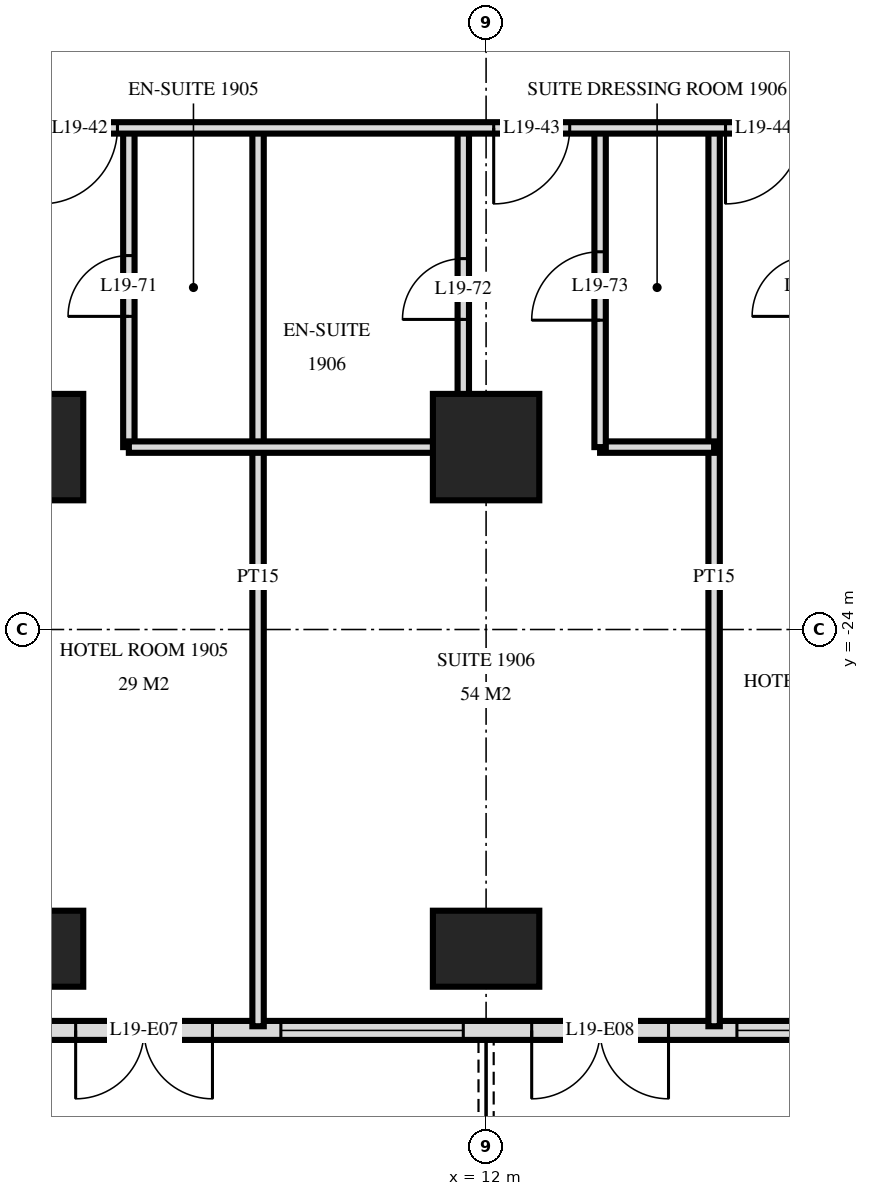
"""IFC4 building model, lengths in metres.
Left out: names, types, materials, properties, quantities, classifications, styles, units other than length and angle.
Written with IfcOpenShell. Run it as: python <this file> out.ifc"""

import sys

from ifc_helpers import new_model, si_unit, direction, frame, frame_2d, origin, origin_2d, place, context, subcontext, project, spatial, rectangle, extrude, element, fill, save


model = new_model("IFC4")
c1 = context("Model", 3, precision=1e-05, world=origin(), true_north=direction((0.0, 1.0)))
c2 = subcontext(c1, "Body", "Model", "MODEL_VIEW")
j1 = project(units=[si_unit("LENGTHUNIT", "METRE"), si_unit("PLANEANGLEUNIT", "RADIAN")], contexts=[c1])
p1 = place(None, origin())
s1 = spatial("IfcSite", under=j1, at=p1, CompositionType="ELEMENT")
p2 = place(p1, origin())
s2 = spatial("IfcBuilding", under=s1, at=p2, CompositionType="ELEMENT")
p3 = place(p2, frame((0.0, 0.0, 78.0)))
s3 = spatial("IfcBuildingStorey", under=s2, at=p3, CompositionType="ELEMENT", Elevation=78.0)
p4 = place(p3, frame((6.0, -28.2, 0.0), z_axis=(0.0, 0.0, 1.0), x_axis=(1.0, 0.0, 0.0)))
e1 = element("IfcColumn", 1, at=p4, inside=s3, PredefinedType="COLUMN", context=c2, shape_type="SweptSolid", body=[
    extrude(rectangle(XDim=1.4, YDim=1.0, at=origin_2d()), origin(), (0.0, 0.0, 1.0), 3.6),
])
p5 = place(p3, frame((6.0, -21.6, 0.0), z_axis=(0.0, 0.0, 1.0), x_axis=(1.0, 0.0, 0.0)))
e2 = element("IfcColumn", 2, at=p5, inside=s3, PredefinedType="COLUMN", context=c2, shape_type="SweptSolid", body=[
    extrude(rectangle(XDim=1.4, YDim=1.4, at=origin_2d()), origin(), (0.0, 0.0, 1.0), 3.6),
])
p6 = place(p3, frame((12.0, -28.2, 0.0), z_axis=(0.0, 0.0, 1.0), x_axis=(1.0, 0.0, 0.0)))
e3 = element("IfcColumn", 3, at=p6, inside=s3, PredefinedType="COLUMN", context=c2, shape_type="SweptSolid", body=[
    extrude(rectangle(XDim=1.4, YDim=1.0, at=origin_2d()), origin(), (0.0, 0.0, 1.0), 3.6),
])
p7 = place(p3, frame((12.0, -21.6, 0.0), z_axis=(0.0, 0.0, 1.0), x_axis=(1.0, 0.0, 0.0)))
e4 = element("IfcColumn", 4, at=p7, inside=s3, PredefinedType="COLUMN", context=c2, shape_type="SweptSolid", body=[
    extrude(rectangle(XDim=1.4, YDim=1.4, at=origin_2d()), origin(), (0.0, 0.0, 1.0), 3.6),
])
p8 = place(p3, frame((-28.775, -29.275, 0.0), z_axis=(0.0, 0.0, 1.0), x_axis=(1.0, 0.0, 0.0)))
e5 = element("IfcWall", 5, at=p8, inside=s3, PredefinedType="SOLIDWALL", context=c2, shape_type="SweptSolid", body=[
    extrude(rectangle(XDim=57.551, YDim=0.25, at=frame_2d((28.775, 0.0))), origin(), (0.0, 0.0, 1.0), 3.32),
])
p9 = place(p8, frame((0.575, 0.0, 0.0)))
e6 = element("IfcOpeningElement", 6, at=p9, cuts=e5, PredefinedType="OPENING", context=c2, shape_type="SweptSolid", body=[
    extrude(rectangle(XDim=1.8, YDim=2.4, at=frame_2d((0.9, 1.2))), frame((0.0, 0.135, 0.0), z_axis=(0.0, -1.0, 0.0), x_axis=(1.0, 0.0, 0.0)), (0.0, 0.0, 1.0), 0.27),
])
p10 = place(p8, frame((5.375, 0.0, 0.0)))
e7 = element("IfcOpeningElement", 7, at=p10, cuts=e5, PredefinedType="OPENING", context=c2, shape_type="SweptSolid", body=[
    extrude(rectangle(XDim=1.8, YDim=2.4, at=frame_2d((0.9, 1.2))), frame((0.0, 0.135, 0.0), z_axis=(0.0, -1.0, 0.0), x_axis=(1.0, 0.0, 0.0)), (0.0, 0.0, 1.0), 0.27),
])
p11 = place(p8, frame((8.075, 0.0, 0.3)))
e8 = element("IfcOpeningElement", 8, at=p11, cuts=e5, PredefinedType="OPENING", context=c2, shape_type="SweptSolid", body=[
    extrude(rectangle(XDim=2.4, YDim=2.1, at=frame_2d((1.2, 1.05))), frame((0.0, 0.135, 0.0), z_axis=(0.0, -1.0, 0.0), x_axis=(1.0, 0.0, 0.0)), (0.0, 0.0, 1.0), 0.27),
])
p12 = place(p8, frame((11.375, 0.0, 0.0)))
e9 = element("IfcOpeningElement", 9, at=p12, cuts=e5, PredefinedType="OPENING", context=c2, shape_type="SweptSolid", body=[
    extrude(rectangle(XDim=1.8, YDim=2.4, at=frame_2d((0.9, 1.2))), frame((0.0, 0.135, 0.0), z_axis=(0.0, -1.0, 0.0), x_axis=(1.0, 0.0, 0.0)), (0.0, 0.0, 1.0), 0.27),
])
p13 = place(p8, frame((14.075, 0.0, 0.3)))
e10 = element("IfcOpeningElement", 10, at=p13, cuts=e5, PredefinedType="OPENING", context=c2, shape_type="SweptSolid", body=[
    extrude(rectangle(XDim=2.4, YDim=2.1, at=frame_2d((1.2, 1.05))), frame((0.0, 0.135, 0.0), z_axis=(0.0, -1.0, 0.0), x_axis=(1.0, 0.0, 0.0)), (0.0, 0.0, 1.0), 0.27),
])
p14 = place(p8, frame((17.075, 0.0, 0.3)))
e11 = element("IfcOpeningElement", 11, at=p14, cuts=e5, PredefinedType="OPENING", context=c2, shape_type="SweptSolid", body=[
    extrude(rectangle(XDim=2.4, YDim=2.1, at=frame_2d((1.2, 1.05))), frame((0.0, 0.135, 0.0), z_axis=(0.0, -1.0, 0.0), x_axis=(1.0, 0.0, 0.0)), (0.0, 0.0, 1.0), 0.27),
])
p15 = place(p8, frame((20.375, 0.0, 0.0)))
e12 = element("IfcOpeningElement", 12, at=p15, cuts=e5, PredefinedType="OPENING", context=c2, shape_type="SweptSolid", body=[
    extrude(rectangle(XDim=1.8, YDim=2.4, at=frame_2d((0.9, 1.2))), frame((0.0, 0.135, 0.0), z_axis=(0.0, -1.0, 0.0), x_axis=(1.0, 0.0, 0.0)), (0.0, 0.0, 1.0), 0.27),
])
p16 = place(p8, frame((23.375, 0.0, 0.0)))
e13 = element("IfcOpeningElement", 13, at=p16, cuts=e5, PredefinedType="OPENING", context=c2, shape_type="SweptSolid", body=[
    extrude(rectangle(XDim=1.8, YDim=2.4, at=frame_2d((0.9, 1.2))), frame((0.0, 0.135, 0.0), z_axis=(0.0, -1.0, 0.0), x_axis=(1.0, 0.0, 0.0)), (0.0, 0.0, 1.0), 0.27),
])
p17 = place(p8, frame((26.075, 0.0, 0.3)))
e14 = element("IfcOpeningElement", 14, at=p17, cuts=e5, PredefinedType="OPENING", context=c2, shape_type="SweptSolid", body=[
    extrude(rectangle(XDim=2.4, YDim=2.1, at=frame_2d((1.2, 1.05))), frame((0.0, 0.135, 0.0), z_axis=(0.0, -1.0, 0.0), x_axis=(1.0, 0.0, 0.0)), (0.0, 0.0, 1.0), 0.27),
])
p18 = place(p8, frame((29.375, 0.0, 0.0)))
e15 = element("IfcOpeningElement", 15, at=p18, cuts=e5, PredefinedType="OPENING", context=c2, shape_type="SweptSolid", body=[
    extrude(rectangle(XDim=1.8, YDim=2.4, at=frame_2d((0.9, 1.2))), frame((0.0, 0.135, 0.0), z_axis=(0.0, -1.0, 0.0), x_axis=(1.0, 0.0, 0.0)), (0.0, 0.0, 1.0), 0.27),
])
p19 = place(p8, frame((32.075, 0.0, 0.3)))
e16 = element("IfcOpeningElement", 16, at=p19, cuts=e5, PredefinedType="OPENING", context=c2, shape_type="SweptSolid", body=[
    extrude(rectangle(XDim=2.4, YDim=2.1, at=frame_2d((1.2, 1.05))), frame((0.0, 0.135, 0.0), z_axis=(0.0, -1.0, 0.0), x_axis=(1.0, 0.0, 0.0)), (0.0, 0.0, 1.0), 0.27),
])
p20 = place(p8, frame((35.375, 0.0, 0.0)))
e17 = element("IfcOpeningElement", 17, at=p20, cuts=e5, PredefinedType="OPENING", context=c2, shape_type="SweptSolid", body=[
    extrude(rectangle(XDim=1.8, YDim=2.4, at=frame_2d((0.9, 1.2))), frame((0.0, 0.135, 0.0), z_axis=(0.0, -1.0, 0.0), x_axis=(1.0, 0.0, 0.0)), (0.0, 0.0, 1.0), 0.27),
])
p21 = place(p8, frame((38.075, 0.0, 0.3)))
e18 = element("IfcOpeningElement", 18, at=p21, cuts=e5, PredefinedType="OPENING", context=c2, shape_type="SweptSolid", body=[
    extrude(rectangle(XDim=2.4, YDim=2.1, at=frame_2d((1.2, 1.05))), frame((0.0, 0.135, 0.0), z_axis=(0.0, -1.0, 0.0), x_axis=(1.0, 0.0, 0.0)), (0.0, 0.0, 1.0), 0.27),
])
p22 = place(p8, frame((41.375, 0.0, 0.0)))
e19 = element("IfcOpeningElement", 19, at=p22, cuts=e5, PredefinedType="OPENING", context=c2, shape_type="SweptSolid", body=[
    extrude(rectangle(XDim=1.8, YDim=2.4, at=frame_2d((0.9, 1.2))), frame((0.0, 0.135, 0.0), z_axis=(0.0, -1.0, 0.0), x_axis=(1.0, 0.0, 0.0)), (0.0, 0.0, 1.0), 0.27),
])
p23 = place(p8, frame((44.075, 0.0, 0.3)))
e20 = element("IfcOpeningElement", 20, at=p23, cuts=e5, PredefinedType="OPENING", context=c2, shape_type="SweptSolid", body=[
    extrude(rectangle(XDim=2.4, YDim=2.1, at=frame_2d((1.2, 1.05))), frame((0.0, 0.135, 0.0), z_axis=(0.0, -1.0, 0.0), x_axis=(1.0, 0.0, 0.0)), (0.0, 0.0, 1.0), 0.27),
])
p24 = place(p8, frame((47.075, 0.0, 0.3)))
e21 = element("IfcOpeningElement", 21, at=p24, cuts=e5, PredefinedType="OPENING", context=c2, shape_type="SweptSolid", body=[
    extrude(rectangle(XDim=2.4, YDim=2.1, at=frame_2d((1.2, 1.05))), frame((0.0, 0.135, 0.0), z_axis=(0.0, -1.0, 0.0), x_axis=(1.0, 0.0, 0.0)), (0.0, 0.0, 1.0), 0.27),
])
p25 = place(p8, frame((50.375, 0.0, 0.0)))
e22 = element("IfcOpeningElement", 22, at=p25, cuts=e5, PredefinedType="OPENING", context=c2, shape_type="SweptSolid", body=[
    extrude(rectangle(XDim=1.8, YDim=2.4, at=frame_2d((0.9, 1.2))), frame((0.0, 0.135, 0.0), z_axis=(0.0, -1.0, 0.0), x_axis=(1.0, 0.0, 0.0)), (0.0, 0.0, 1.0), 0.27),
])
p26 = place(p8, frame((53.375, 0.0, 0.0)))
e23 = element("IfcOpeningElement", 23, at=p26, cuts=e5, PredefinedType="OPENING", context=c2, shape_type="SweptSolid", body=[
    extrude(rectangle(XDim=1.8, YDim=2.4, at=frame_2d((0.9, 1.2))), frame((0.0, 0.135, 0.0), z_axis=(0.0, -1.0, 0.0), x_axis=(1.0, 0.0, 0.0)), (0.0, 0.0, 1.0), 0.27),
])
p27 = place(p3, frame((15.0, -29.22, 0.0), z_axis=(0.0, 0.0, 1.0), x_axis=(0.0, 1.0, 0.0)))
e24 = element("IfcWall", 24, at=p27, inside=s3, PredefinedType="PARTITIONING", context=c2, shape_type="SweptSolid", body=[
    extrude(rectangle(XDim=11.82, YDim=0.15, at=frame_2d((5.91, 0.0))), origin(), (0.0, 0.0, 1.0), 3.32),
])
p28 = place(p3, frame((13.5, -21.6, 0.0), z_axis=(0.0, 0.0, 1.0), x_axis=(0.0, 1.0, 0.0)))
e25 = element("IfcWall", 25, at=p28, inside=s3, PredefinedType="PARTITIONING", context=c2, shape_type="SweptSolid", body=[
    extrude(rectangle(XDim=4.2, YDim=0.15, at=frame_2d((2.1, 0.0))), origin(), (0.0, 0.0, 1.0), 3.32),
])
p29 = place(p28, frame((1.67, 0.0, 0.0)))
e26 = element("IfcOpeningElement", 26, at=p29, cuts=e25, PredefinedType="OPENING", context=c2, shape_type="SweptSolid", body=[
    extrude(rectangle(XDim=0.9, YDim=2.1, at=frame_2d((0.45, 1.05))), frame((0.0, 0.085, 0.0), z_axis=(0.0, -1.0, 0.0), x_axis=(1.0, 0.0, 0.0)), (0.0, 0.0, 1.0), 0.17),
])
p30 = place(p3, frame((11.7, -21.6, 0.0), z_axis=(0.0, 0.0, 1.0), x_axis=(0.0, 1.0, 0.0)))
e27 = element("IfcWall", 27, at=p30, inside=s3, PredefinedType="PARTITIONING", context=c2, shape_type="SweptSolid", body=[
    extrude(rectangle(XDim=4.2, YDim=0.15, at=frame_2d((2.1, 0.0))), origin(), (0.0, 0.0, 1.0), 3.32),
])
p31 = place(p30, frame((1.68, 0.0, 0.0)))
e28 = element("IfcOpeningElement", 28, at=p31, cuts=e27, PredefinedType="OPENING", context=c2, shape_type="SweptSolid", body=[
    extrude(rectangle(XDim=0.8, YDim=2.1, at=frame_2d((0.4, 1.05))), frame((0.0, 0.085, 0.0), z_axis=(0.0, -1.0, 0.0), x_axis=(1.0, 0.0, 0.0)), (0.0, 0.0, 1.0), 0.17),
])
p32 = place(p3, frame((9.0, -29.22, 0.0), z_axis=(0.0, 0.0, 1.0), x_axis=(0.0, 1.0, 0.0)))
e29 = element("IfcWall", 29, at=p32, inside=s3, PredefinedType="PARTITIONING", context=c2, shape_type="SweptSolid", body=[
    extrude(rectangle(XDim=11.82, YDim=0.15, at=frame_2d((5.91, 0.0))), origin(), (0.0, 0.0, 1.0), 3.32),
])
p33 = place(p3, frame((7.3, -21.6, 0.0), z_axis=(0.0, 0.0, 1.0), x_axis=(0.0, 1.0, 0.0)))
e30 = element("IfcWall", 30, at=p33, inside=s3, PredefinedType="PARTITIONING", context=c2, shape_type="SweptSolid", body=[
    extrude(rectangle(XDim=4.2, YDim=0.15, at=frame_2d((2.1, 0.0))), origin(), (0.0, 0.0, 1.0), 3.32),
])
p34 = place(p33, frame((1.72, 0.0, 0.0)))
e31 = element("IfcOpeningElement", 31, at=p34, cuts=e30, PredefinedType="OPENING", context=c2, shape_type="SweptSolid", body=[
    extrude(rectangle(XDim=0.8, YDim=2.1, at=frame_2d((0.4, 1.05))), frame((0.0, 0.085, 0.0), z_axis=(0.0, -1.0, 0.0), x_axis=(1.0, 0.0, 0.0)), (0.0, 0.0, 1.0), 0.17),
])
p35 = place(p3, frame((7.3, -21.6, 0.0), z_axis=(0.0, 0.0, 1.0), x_axis=(1.0, 0.0, 0.0)))
e32 = element("IfcWall", 32, at=p35, inside=s3, PredefinedType="PARTITIONING", context=c2, shape_type="SweptSolid", body=[
    extrude(rectangle(XDim=4.4, YDim=0.15, at=frame_2d((2.2, 0.0))), origin(), (0.0, 0.0, 1.0), 3.32),
])
p36 = place(p3, frame((13.5, -21.6, 0.0), z_axis=(0.0, 0.0, 1.0), x_axis=(1.0, 0.0, 0.0)))
e33 = element("IfcWall", 33, at=p36, inside=s3, PredefinedType="PARTITIONING", context=c2, shape_type="SweptSolid", body=[
    extrude(rectangle(XDim=1.5, YDim=0.15, at=frame_2d((0.75, 0.0))), origin(), (0.0, 0.0, 1.0), 3.32),
])
p37 = place(p3, frame((-33.12, -17.4, 0.0), z_axis=(0.0, 0.0, 1.0), x_axis=(1.0, 0.0, 0.0)))
e34 = element("IfcWall", 34, at=p37, inside=s3, PredefinedType="PARTITIONING", context=c2, shape_type="SweptSolid", body=[
    extrude(rectangle(XDim=66.24, YDim=0.15, at=frame_2d((33.12, 0.0))), origin(), (0.0, 0.0, 1.0), 3.32),
])
p38 = place(p37, frame((10.27, 0.0, 0.0)))
e35 = element("IfcOpeningElement", 35, at=p38, cuts=e34, PredefinedType="OPENING", context=c2, shape_type="SweptSolid", body=[
    extrude(rectangle(XDim=1.0, YDim=2.1, at=frame_2d((0.5, 1.05))), frame((0.0, 0.085, 0.0), z_axis=(0.0, -1.0, 0.0), x_axis=(1.0, 0.0, 0.0)), (0.0, 0.0, 1.0), 0.17),
])
p39 = place(p37, frame((16.97, 0.0, 0.0)))
e36 = element("IfcOpeningElement", 36, at=p39, cuts=e34, PredefinedType="OPENING", context=c2, shape_type="SweptSolid", body=[
    extrude(rectangle(XDim=1.0, YDim=2.1, at=frame_2d((0.5, 1.05))), frame((0.0, 0.085, 0.0), z_axis=(0.0, -1.0, 0.0), x_axis=(1.0, 0.0, 0.0)), (0.0, 0.0, 1.0), 0.17),
])
p40 = place(p37, frame((28.42, 0.0, 0.0)))
e37 = element("IfcOpeningElement", 37, at=p40, cuts=e34, PredefinedType="OPENING", context=c2, shape_type="SweptSolid", body=[
    extrude(rectangle(XDim=1.0, YDim=2.1, at=frame_2d((0.5, 1.05))), frame((0.0, 0.085, 0.0), z_axis=(0.0, -1.0, 0.0), x_axis=(1.0, 0.0, 0.0)), (0.0, 0.0, 1.0), 0.17),
])
p41 = place(p37, frame((30.82, 0.0, 0.0)))
e38 = element("IfcOpeningElement", 38, at=p41, cuts=e34, PredefinedType="OPENING", context=c2, shape_type="SweptSolid", body=[
    extrude(rectangle(XDim=1.0, YDim=2.1, at=frame_2d((0.5, 1.05))), frame((0.0, 0.085, 0.0), z_axis=(0.0, -1.0, 0.0), x_axis=(1.0, 0.0, 0.0)), (0.0, 0.0, 1.0), 0.17),
])
p42 = place(p37, frame((39.27, 0.0, 0.0)))
e39 = element("IfcOpeningElement", 39, at=p42, cuts=e34, PredefinedType="OPENING", context=c2, shape_type="SweptSolid", body=[
    extrude(rectangle(XDim=1.0, YDim=2.1, at=frame_2d((0.5, 1.05))), frame((0.0, 0.085, 0.0), z_axis=(0.0, -1.0, 0.0), x_axis=(1.0, 0.0, 0.0)), (0.0, 0.0, 1.0), 0.17),
])
p43 = place(p37, frame((45.22, 0.0, 0.0)))
e40 = element("IfcOpeningElement", 40, at=p43, cuts=e34, PredefinedType="OPENING", context=c2, shape_type="SweptSolid", body=[
    extrude(rectangle(XDim=1.0, YDim=2.1, at=frame_2d((0.5, 1.05))), frame((0.0, 0.085, 0.0), z_axis=(0.0, -1.0, 0.0), x_axis=(1.0, 0.0, 0.0)), (0.0, 0.0, 1.0), 0.17),
])
p44 = place(p37, frame((48.27, 0.0, 0.0)))
e41 = element("IfcOpeningElement", 41, at=p44, cuts=e34, PredefinedType="OPENING", context=c2, shape_type="SweptSolid", body=[
    extrude(rectangle(XDim=1.0, YDim=2.1, at=frame_2d((0.5, 1.05))), frame((0.0, 0.085, 0.0), z_axis=(0.0, -1.0, 0.0), x_axis=(1.0, 0.0, 0.0)), (0.0, 0.0, 1.0), 0.17),
])
p45 = place(p37, frame((1.87, 0.0, 0.0)))
e42 = element("IfcOpeningElement", 42, at=p45, cuts=e34, PredefinedType="OPENING", context=c2, shape_type="SweptSolid", body=[
    extrude(rectangle(XDim=1.0, YDim=2.1, at=frame_2d((0.5, 1.05))), frame((0.0, 0.085, 0.0), z_axis=(0.0, -1.0, 0.0), x_axis=(1.0, 0.0, 0.0)), (0.0, 0.0, 1.0), 0.17),
])
p46 = place(p37, frame((60.37, 0.0, 0.0)))
e43 = element("IfcOpeningElement", 43, at=p46, cuts=e34, PredefinedType="OPENING", context=c2, shape_type="SweptSolid", body=[
    extrude(rectangle(XDim=1.0, YDim=2.1, at=frame_2d((0.5, 1.05))), frame((0.0, 0.085, 0.0), z_axis=(0.0, -1.0, 0.0), x_axis=(1.0, 0.0, 0.0)), (0.0, 0.0, 1.0), 0.17),
])
p47 = place(p20, frame((0.9, 0.0, 0.0), z_axis=(0.0, 0.0, 1.0), x_axis=(-1.0, 0.0, 0.0)))
e44 = element("IfcDoor", 44, at=p47, inside=s3, OperationType="DOUBLE_DOOR_SINGLE_SWING", PredefinedType="DOOR", context=c2, shape_type="SweptSolid", body=[
    extrude(rectangle(XDim=1.8, YDim=2.4, at=frame_2d((0.0, 1.2))), frame((0.0, -0.025, 0.0), z_axis=(0.0, 1.0, 0.0), x_axis=(-1.0, 0.0, 0.0)), (0.0, 0.0, 1.0), 0.05),
])
fill(e17, e44)
p48 = place(p21, origin())
e45 = element("IfcWindow", 45, at=p48, inside=s3, PartitioningType="SINGLE_PANEL", PredefinedType="WINDOW", context=c2, shape_type="SweptSolid", body=[
    extrude(rectangle(XDim=2.4, YDim=2.1, at=frame_2d((1.2, 1.05))), frame((0.0, 0.03, 0.0), z_axis=(0.0, -1.0, 0.0), x_axis=(1.0, 0.0, 0.0)), (0.0, 0.0, 1.0), 0.06),
])
fill(e18, e45)
p49 = place(p22, frame((0.9, 0.0, 0.0), z_axis=(0.0, 0.0, 1.0), x_axis=(-1.0, 0.0, 0.0)))
e46 = element("IfcDoor", 46, at=p49, inside=s3, OperationType="DOUBLE_DOOR_SINGLE_SWING", PredefinedType="DOOR", context=c2, shape_type="SweptSolid", body=[
    extrude(rectangle(XDim=1.8, YDim=2.4, at=frame_2d((0.0, 1.2))), frame((0.0, -0.025, 0.0), z_axis=(0.0, 1.0, 0.0), x_axis=(-1.0, 0.0, 0.0)), (0.0, 0.0, 1.0), 0.05),
])
fill(e19, e46)
p50 = place(p23, origin())
e47 = element("IfcWindow", 47, at=p50, inside=s3, PartitioningType="SINGLE_PANEL", PredefinedType="WINDOW", context=c2, shape_type="SweptSolid", body=[
    extrude(rectangle(XDim=2.4, YDim=2.1, at=frame_2d((1.2, 1.05))), frame((0.0, 0.03, 0.0), z_axis=(0.0, -1.0, 0.0), x_axis=(1.0, 0.0, 0.0)), (0.0, 0.0, 1.0), 0.06),
])
fill(e20, e47)
p51 = place(p42, frame((0.5, 0.0, 0.0), z_axis=(0.0, 0.0, 1.0), x_axis=(-1.0, 0.0, 0.0)))
e48 = element("IfcDoor", 48, at=p51, inside=s3, OperationType="SINGLE_SWING_LEFT", PredefinedType="DOOR", context=c2, shape_type="SweptSolid", body=[
    extrude(rectangle(XDim=1.0, YDim=2.1, at=frame_2d((0.0, 1.05))), frame((0.0, -0.025, 0.0), z_axis=(0.0, 1.0, 0.0), x_axis=(-1.0, 0.0, 0.0)), (0.0, 0.0, 1.0), 0.05),
])
fill(e39, e48)
p52 = place(p43, frame((0.5, 0.0, 0.0), z_axis=(0.0, 0.0, 1.0), x_axis=(-1.0, 0.0, 0.0)))
e49 = element("IfcDoor", 49, at=p52, inside=s3, OperationType="SINGLE_SWING_LEFT", PredefinedType="DOOR", context=c2, shape_type="SweptSolid", body=[
    extrude(rectangle(XDim=1.0, YDim=2.1, at=frame_2d((0.0, 1.05))), frame((0.0, -0.025, 0.0), z_axis=(0.0, 1.0, 0.0), x_axis=(-1.0, 0.0, 0.0)), (0.0, 0.0, 1.0), 0.05),
])
fill(e40, e49)
p53 = place(p44, frame((0.5, 0.0, 0.0), z_axis=(0.0, 0.0, 1.0), x_axis=(-1.0, 0.0, 0.0)))
e50 = element("IfcDoor", 50, at=p53, inside=s3, OperationType="SINGLE_SWING_LEFT", PredefinedType="DOOR", context=c2, shape_type="SweptSolid", body=[
    extrude(rectangle(XDim=1.0, YDim=2.1, at=frame_2d((0.0, 1.05))), frame((0.0, -0.025, 0.0), z_axis=(0.0, 1.0, 0.0), x_axis=(-1.0, 0.0, 0.0)), (0.0, 0.0, 1.0), 0.05),
])
fill(e41, e50)
p54 = place(p34, origin())
e51 = element("IfcDoor", 51, at=p54, inside=s3, OperationType="SINGLE_SWING_RIGHT", PredefinedType="DOOR", context=c2, shape_type="SweptSolid", body=[
    extrude(rectangle(XDim=0.8, YDim=2.1, at=frame_2d((0.4, 1.05))), frame((0.0, 0.025, 0.0), z_axis=(0.0, -1.0, 0.0), x_axis=(1.0, 0.0, 0.0)), (0.0, 0.0, 1.0), 0.05),
])
fill(e31, e51)
p55 = place(p31, origin())
e52 = element("IfcDoor", 52, at=p55, inside=s3, OperationType="SINGLE_SWING_RIGHT", PredefinedType="DOOR", context=c2, shape_type="SweptSolid", body=[
    extrude(rectangle(XDim=0.8, YDim=2.1, at=frame_2d((0.4, 1.05))), frame((0.0, 0.025, 0.0), z_axis=(0.0, -1.0, 0.0), x_axis=(1.0, 0.0, 0.0)), (0.0, 0.0, 1.0), 0.05),
])
fill(e28, e52)
p56 = place(p29, origin())
e53 = element("IfcDoor", 53, at=p56, inside=s3, OperationType="SINGLE_SWING_RIGHT", PredefinedType="DOOR", context=c2, shape_type="SweptSolid", body=[
    extrude(rectangle(XDim=0.9, YDim=2.1, at=frame_2d((0.45, 1.05))), frame((0.0, 0.025, 0.0), z_axis=(0.0, -1.0, 0.0), x_axis=(1.0, 0.0, 0.0)), (0.0, 0.0, 1.0), 0.05),
])
fill(e26, e53)
save(model, sys.argv[1])
